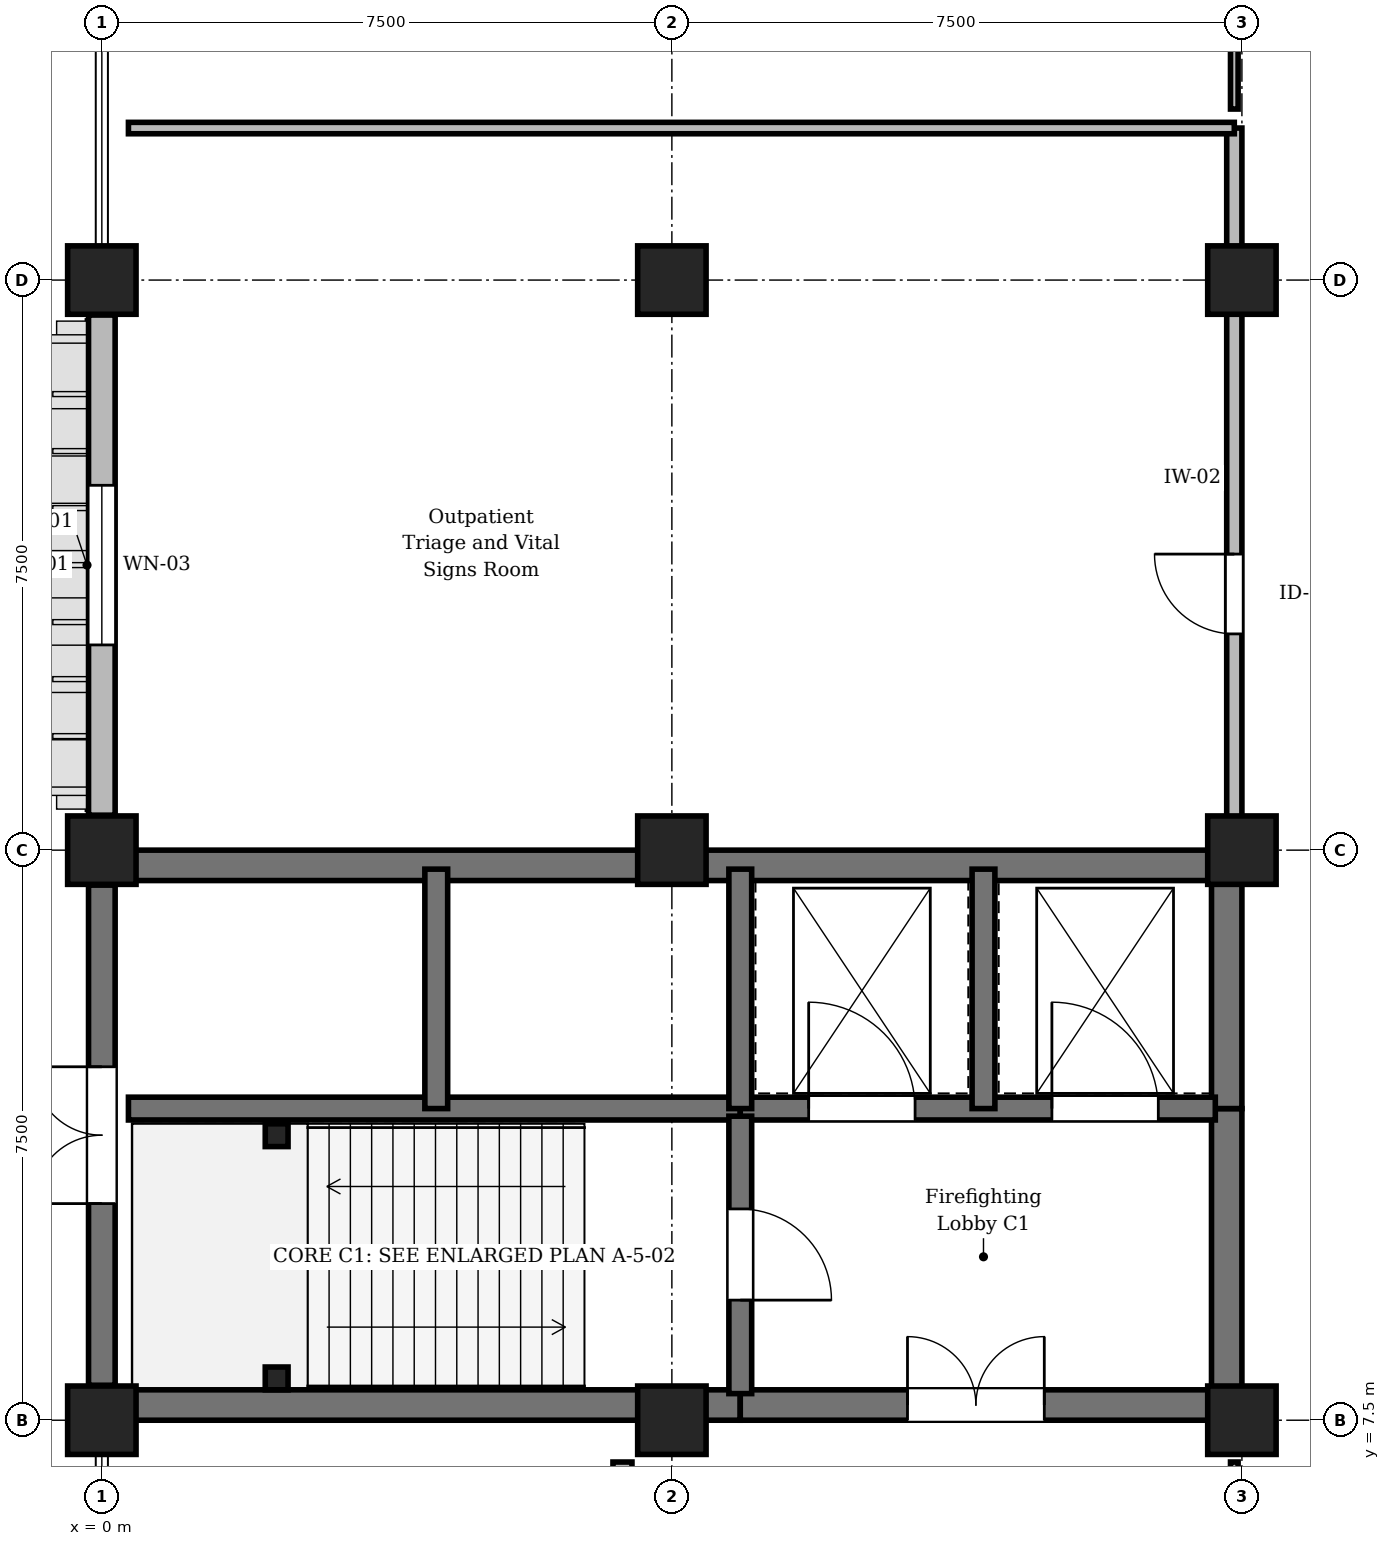
"""IFC4 building model, lengths in metres.
Left out: names, types, materials, properties, quantities, classifications, styles, units other than length and angle.
Written with IfcOpenShell. Run it as: python <this file> out.ifc"""

import sys

from ifc_helpers import new_model, si_unit, direction, frame, frame_2d, origin, origin_2d, place, context, subcontext, project, spatial, rectangle, circle, i_section, extrude, element, fill, save


model = new_model("IFC4")
c1 = context("Model", 3, precision=1e-05, world=origin(), true_north=direction((0.0, 1.0)))
c2 = subcontext(c1, "Body", "Model", "MODEL_VIEW")
j1 = project(units=[si_unit("LENGTHUNIT", "METRE"), si_unit("PLANEANGLEUNIT", "RADIAN")], contexts=[c1])
p1 = place(None, origin())
s1 = spatial("IfcSite", under=j1, at=p1, CompositionType="ELEMENT")
p2 = place(p1, origin())
s2 = spatial("IfcBuilding", under=s1, at=p2, CompositionType="ELEMENT")
p3 = place(p2, origin())
s3 = spatial("IfcBuildingStorey", under=s2, at=p3, CompositionType="ELEMENT", Elevation=0.0)
for number, where, z_axis, x_axis in (
    (1, (0.0, 7.5, 0.0), (0.0, 0.0, 1.0), (1.0, 0.0, 0.0)),
    (2, (0.0, 15.0, 0.0), (0.0, 0.0, 1.0), (1.0, 0.0, 0.0)),
):
    element("IfcColumn", number, at=place(p3, frame(where, z_axis=z_axis, x_axis=x_axis)), inside=s3, PredefinedType="COLUMN", context=c2, shape_type="SweptSolid", body=[
        extrude(rectangle(XDim=0.9, YDim=0.9, at=origin_2d()), origin(), (0.0, 0.0, 1.0), 4.8),
    ])
p4 = place(p3, frame((0.0, 22.5, 0.0), z_axis=(0.0, 0.0, 1.0), x_axis=(1.0, 0.0, 0.0)))
e3 = element("IfcColumn", 3, at=p4, inside=s3, PredefinedType="COLUMN", context=c2, shape_type="SweptSolid", body=[
    extrude(circle(Radius=0.45, at=origin_2d()), origin(), (0.0, 0.0, 1.0), 4.8),
])
p5 = place(p3, frame((7.5, 7.5, 0.0), z_axis=(0.0, 0.0, 1.0), x_axis=(1.0, 0.0, 0.0)))
e4 = element("IfcColumn", 4, at=p5, inside=s3, PredefinedType="COLUMN", context=c2, shape_type="SweptSolid", body=[
    extrude(rectangle(XDim=0.9, YDim=0.9, at=origin_2d()), origin(), (0.0, 0.0, 1.0), 4.8),
])
p6 = place(p3, frame((7.5, 15.0, 0.0), z_axis=(0.0, 0.0, 1.0), x_axis=(1.0, 0.0, 0.0)))
e5 = element("IfcColumn", 5, at=p6, inside=s3, PredefinedType="COLUMN", context=c2, shape_type="SweptSolid", body=[
    extrude(circle(Radius=0.45, at=origin_2d()), origin(), (0.0, 0.0, 1.0), 4.8),
])
p7 = place(p3, frame((7.5, 22.5, 0.0), z_axis=(0.0, 0.0, 1.0), x_axis=(1.0, 0.0, 0.0)))
e6 = element("IfcColumn", 6, at=p7, inside=s3, PredefinedType="COLUMN", context=c2, shape_type="SweptSolid", body=[
    extrude(rectangle(XDim=0.9, YDim=0.9, at=origin_2d()), origin(), (0.0, 0.0, 1.0), 4.8),
])
p8 = place(p3, frame((15.0, 7.5, 0.0), z_axis=(0.0, 0.0, 1.0), x_axis=(1.0, 0.0, 0.0)))
e7 = element("IfcColumn", 7, at=p8, inside=s3, PredefinedType="COLUMN", context=c2, shape_type="SweptSolid", body=[
    extrude(circle(Radius=0.45, at=origin_2d()), origin(), (0.0, 0.0, 1.0), 4.8),
])
for number, where, z_axis, x_axis in (
    (8, (15.0, 15.0, 0.0), (0.0, 0.0, 1.0), (1.0, 0.0, 0.0)),
    (9, (15.0, 22.5, 0.0), (0.0, 0.0, 1.0), (1.0, 0.0, 0.0)),
):
    element("IfcColumn", number, at=place(p3, frame(where, z_axis=z_axis, x_axis=x_axis)), inside=s3, PredefinedType="COLUMN", context=c2, shape_type="SweptSolid", body=[
        extrude(rectangle(XDim=0.9, YDim=0.9, at=origin_2d()), origin(), (0.0, 0.0, 1.0), 4.8),
    ])
for number, where, z_axis, x_axis in (
    (10, (2.3, 8.05, 0.0), (0.0, 0.0, 1.0), (1.0, 0.0, 0.0)),
    (11, (2.3, 11.25, 0.0), (0.0, 0.0, 1.0), (1.0, 0.0, 0.0)),
):
    element("IfcColumn", number, at=place(p3, frame(where, z_axis=z_axis, x_axis=x_axis)), inside=s3, PredefinedType="COLUMN", context=c2, shape_type="SweptSolid", body=[
        extrude(i_section(OverallWidth=0.3, OverallDepth=0.3, WebThickness=0.011, FlangeThickness=0.019, FilletRadius=0.027, at=origin_2d()), origin(), (0.0, 0.0, 1.0), 4.8),
    ])
p9 = place(p3, frame((0.0, 7.96, 0.0), z_axis=(0.0, 0.0, 1.0), x_axis=(0.0, 1.0, 0.0)))
e12 = element("IfcWall", 12, at=p9, inside=s3, PredefinedType="SHEAR", context=c2, shape_type="SweptSolid", body=[
    extrude(rectangle(XDim=6.58, YDim=0.35, at=frame_2d((3.29, 0.0))), origin(), (0.0, 0.0, 1.0), 4.5),
])
p10 = place(p9, frame((2.39, 0.0, 0.0)))
e13 = element("IfcOpeningElement", 13, at=p10, cuts=e12, PredefinedType="OPENING", context=c2, shape_type="SweptSolid", body=[
    extrude(rectangle(XDim=1.8, YDim=2.5, at=frame_2d((0.9, 1.25))), frame((0.0, 0.185, 0.0), z_axis=(0.0, -1.0, 0.0), x_axis=(1.0, 0.0, 0.0)), (0.0, 0.0, 1.0), 0.37),
])
p11 = place(p3, frame((0.0, 15.46, 0.0), z_axis=(0.0, 0.0, 1.0), x_axis=(0.0, 1.0, 0.0)))
e14 = element("IfcWall", 14, at=p11, inside=s3, PredefinedType="STANDARD", context=c2, shape_type="SweptSolid", body=[
    extrude(rectangle(XDim=6.58, YDim=0.35, at=frame_2d((3.29, 0.0))), origin(), (0.0, 0.0, 1.0), 3.9),
])
p12 = place(p11, frame((2.24, 0.0, 0.9)))
e15 = element("IfcOpeningElement", 15, at=p12, cuts=e14, PredefinedType="OPENING", context=c2, shape_type="SweptSolid", body=[
    extrude(rectangle(XDim=2.1, YDim=2.4, at=frame_2d((1.05, 1.2))), frame((0.0, 0.185, 0.0), z_axis=(0.0, -1.0, 0.0), x_axis=(1.0, 0.0, 0.0)), (0.0, 0.0, 1.0), 0.37),
])
p13 = place(p3, frame((0.35, 7.7, 0.0), z_axis=(0.0, 0.0, 1.0), x_axis=(1.0, 0.0, 0.0)))
e16 = element("IfcWall", 16, at=p13, inside=s3, PredefinedType="SHEAR", context=c2, shape_type="SweptSolid", body=[
    extrude(rectangle(XDim=8.05, YDim=0.4, at=frame_2d((4.025, 0.0))), origin(), (0.0, 0.0, 1.0), 4.5),
])
p14 = place(p3, frame((8.4, 7.7, 0.0), z_axis=(0.0, 0.0, 1.0), x_axis=(1.0, 0.0, 0.0)))
e17 = element("IfcWall", 17, at=p14, inside=s3, PredefinedType="SHEAR", context=c2, shape_type="SweptSolid", body=[
    extrude(rectangle(XDim=6.25, YDim=0.4, at=frame_2d((3.125, 0.0))), origin(), (0.0, 0.0, 1.0), 4.5),
])
p15 = place(p14, frame((2.2, 0.0, 0.0)))
e18 = element("IfcOpeningElement", 18, at=p15, cuts=e17, PredefinedType="OPENING", context=c2, shape_type="SweptSolid", body=[
    extrude(rectangle(XDim=1.8, YDim=2.25, at=frame_2d((0.9, 1.125))), frame((0.0, 0.21, 0.0), z_axis=(0.0, -1.0, 0.0), x_axis=(1.0, 0.0, 0.0)), (0.0, 0.0, 1.0), 0.42),
])
p16 = place(p3, frame((0.35, 14.8, 0.0), z_axis=(0.0, 0.0, 1.0), x_axis=(1.0, 0.0, 0.0)))
e19 = element("IfcWall", 19, at=p16, inside=s3, PredefinedType="SHEAR", context=c2, shape_type="SweptSolid", body=[
    extrude(rectangle(XDim=14.3, YDim=0.4, at=frame_2d((7.15, 0.0))), origin(), (0.0, 0.0, 1.0), 4.5),
])
p17 = place(p3, frame((14.8, 7.85, 0.0), z_axis=(0.0, 0.0, 1.0), x_axis=(0.0, 1.0, 0.0)))
e20 = element("IfcWall", 20, at=p17, inside=s3, PredefinedType="SHEAR", context=c2, shape_type="SweptSolid", body=[
    extrude(rectangle(XDim=3.75, YDim=0.4, at=frame_2d((1.875, 0.0))), origin(), (0.0, 0.0, 1.0), 4.5),
])
p18 = place(p3, frame((14.8, 11.6, 0.0), z_axis=(0.0, 0.0, 1.0), x_axis=(0.0, 1.0, 0.0)))
e21 = element("IfcWall", 21, at=p18, inside=s3, PredefinedType="SHEAR", context=c2, shape_type="SweptSolid", body=[
    extrude(rectangle(XDim=3.05, YDim=0.4, at=frame_2d((1.525, 0.0))), origin(), (0.0, 0.0, 1.0), 4.5),
])
p19 = place(p3, frame((0.35, 11.6, 0.0), z_axis=(0.0, 0.0, 1.0), x_axis=(1.0, 0.0, 0.0)))
e22 = element("IfcWall", 22, at=p19, inside=s3, PredefinedType="SHEAR", context=c2, shape_type="SweptSolid", body=[
    extrude(rectangle(XDim=8.05, YDim=0.3, at=frame_2d((4.025, 0.0))), origin(), (0.0, 0.0, 1.0), 4.5),
])
p20 = place(p3, frame((8.4, 11.6, 0.0), z_axis=(0.0, 0.0, 1.0), x_axis=(1.0, 0.0, 0.0)))
e23 = element("IfcWall", 23, at=p20, inside=s3, PredefinedType="SHEAR", context=c2, shape_type="SweptSolid", body=[
    extrude(rectangle(XDim=6.25, YDim=0.3, at=frame_2d((3.125, 0.0))), origin(), (0.0, 0.0, 1.0), 4.5),
])
p21 = place(p20, frame((0.9, 0.0, 0.0)))
e24 = element("IfcOpeningElement", 24, at=p21, cuts=e23, PredefinedType="OPENING", context=c2, shape_type="SweptSolid", body=[
    extrude(rectangle(XDim=1.4, YDim=2.25, at=frame_2d((0.7, 1.125))), frame((0.0, 0.16, 0.0), z_axis=(0.0, -1.0, 0.0), x_axis=(1.0, 0.0, 0.0)), (0.0, 0.0, 1.0), 0.32),
])
p22 = place(p20, frame((4.1, 0.0, 0.0)))
e25 = element("IfcOpeningElement", 25, at=p22, cuts=e23, PredefinedType="OPENING", context=c2, shape_type="SweptSolid", body=[
    extrude(rectangle(XDim=1.4, YDim=2.25, at=frame_2d((0.7, 1.125))), frame((0.0, 0.16, 0.0), z_axis=(0.0, -1.0, 0.0), x_axis=(1.0, 0.0, 0.0)), (0.0, 0.0, 1.0), 0.32),
])
p23 = place(p3, frame((8.4, 11.5, 0.0), z_axis=(0.0, 0.0, 1.0), x_axis=(0.0, -1.0, 0.0)))
e26 = element("IfcWall", 26, at=p23, inside=s3, PredefinedType="SHEAR", context=c2, shape_type="SweptSolid", body=[
    extrude(rectangle(XDim=3.65, YDim=0.3, at=frame_2d((1.825, 0.0))), origin(), (0.0, 0.0, 1.0), 4.5),
])
p24 = place(p23, frame((1.22, 0.0, 0.0)))
e27 = element("IfcOpeningElement", 27, at=p24, cuts=e26, PredefinedType="OPENING", context=c2, shape_type="SweptSolid", body=[
    extrude(rectangle(XDim=1.2, YDim=2.25, at=frame_2d((0.6, 1.125))), frame((0.0, 0.16, 0.0), z_axis=(0.0, -1.0, 0.0), x_axis=(1.0, 0.0, 0.0)), (0.0, 0.0, 1.0), 0.32),
])
for number, where, z_axis, x_axis in (
    (28, (4.4, 11.6, 0.0), (0.0, 0.0, 1.0), (0.0, 1.0, 0.0)),
    (29, (8.4, 11.6, 0.0), (0.0, 0.0, 1.0), (0.0, 1.0, 0.0)),
    (30, (11.6, 11.6, 0.0), (0.0, 0.0, 1.0), (0.0, 1.0, 0.0)),
):
    element("IfcWall", number, at=place(p3, frame(where, z_axis=z_axis, x_axis=x_axis)), inside=s3, PredefinedType="SHEAR", context=c2, shape_type="SweptSolid", body=[
        extrude(rectangle(XDim=3.15, YDim=0.3, at=frame_2d((1.575, 0.0))), origin(), (0.0, 0.0, 1.0), 4.5),
    ])
p25 = place(p3, frame((6.85, 0.35, 0.0), z_axis=(0.0, 0.0, 1.0), x_axis=(0.0, 1.0, 0.0)))
e31 = element("IfcWall", 31, at=p25, inside=s3, PredefinedType="STANDARD", context=c2, shape_type="SweptSolid", body=[
    extrude(rectangle(XDim=6.6, YDim=0.25, at=frame_2d((3.3, 0.0))), origin(), (0.0, 0.0, 1.0), 4.485),
])
p26 = place(p25, frame((2.75, 0.0, 0.0)))
e32 = element("IfcOpeningElement", 32, at=p26, cuts=e31, PredefinedType="OPENING", context=c2, shape_type="SweptSolid", body=[
    extrude(rectangle(XDim=1.1, YDim=2.2, at=frame_2d((0.55, 1.1))), frame((0.0, 0.135, 0.0), z_axis=(0.0, -1.0, 0.0), x_axis=(1.0, 0.0, 0.0)), (0.0, 0.0, 1.0), 0.27),
])
p27 = place(p3, frame((14.9, 0.35, 0.0), z_axis=(0.0, 0.0, 1.0), x_axis=(0.0, 1.0, 0.0)))
e33 = element("IfcWall", 33, at=p27, inside=s3, PredefinedType="PARTITIONING", context=c2, shape_type="SweptSolid", body=[
    extrude(rectangle(XDim=6.6, YDim=0.1, at=frame_2d((3.3, 0.0))), origin(), (0.0, 0.0, 1.0), 3.935),
])
p28 = place(p27, frame((2.775, 0.0, 0.0)))
e34 = element("IfcOpeningElement", 34, at=p28, cuts=e33, PredefinedType="OPENING", context=c2, shape_type="SweptSolid", body=[
    extrude(rectangle(XDim=1.05, YDim=2.2, at=frame_2d((0.525, 1.1))), frame((0.0, 0.06, 0.0), z_axis=(0.0, -1.0, 0.0), x_axis=(1.0, 0.0, 0.0)), (0.0, 0.0, 1.0), 0.12),
])
p29 = place(p3, frame((14.9, 15.3, 0.0), z_axis=(0.0, 0.0, 1.0), x_axis=(0.0, 1.0, 0.0)))
e35 = element("IfcWall", 35, at=p29, inside=s3, PredefinedType="STANDARD", context=c2, shape_type="SweptSolid", body=[
    extrude(rectangle(XDim=9.2, YDim=0.2, at=frame_2d((4.6, 0.0))), origin(), (0.0, 0.0, 1.0), 3.785),
])
p30 = place(p29, frame((2.545, 0.0, 0.0)))
e36 = element("IfcOpeningElement", 36, at=p30, cuts=e35, PredefinedType="OPENING", context=c2, shape_type="SweptSolid", body=[
    extrude(rectangle(XDim=1.05, YDim=2.2, at=frame_2d((0.525, 1.1))), frame((0.0, 0.11, 0.0), z_axis=(0.0, -1.0, 0.0), x_axis=(1.0, 0.0, 0.0)), (0.0, 0.0, 1.0), 0.22),
])
p31 = place(p3, frame((14.9, 24.75, 0.0), z_axis=(0.0, 0.0, 1.0), x_axis=(0.0, 1.0, 0.0)))
e37 = element("IfcWall", 37, at=p31, inside=s3, PredefinedType="PARTITIONING", context=c2, shape_type="SweptSolid", body=[
    extrude(rectangle(XDim=9.75, YDim=0.1, at=frame_2d((4.875, 0.0))), origin(), (0.0, 0.0, 1.0), 3.785),
])
p32 = place(p31, frame((1.89, 0.0, 0.0)))
e38 = element("IfcOpeningElement", 38, at=p32, cuts=e37, PredefinedType="OPENING", context=c2, shape_type="SweptSolid", body=[
    extrude(rectangle(XDim=1.05, YDim=2.2, at=frame_2d((0.525, 1.1))), frame((0.0, 0.06, 0.0), z_axis=(0.0, -1.0, 0.0), x_axis=(1.0, 0.0, 0.0)), (0.0, 0.0, 1.0), 0.12),
])
p33 = place(p3, frame((0.35, 24.5, 0.0), z_axis=(0.0, 0.0, 1.0), x_axis=(1.0, 0.0, 0.0)))
e39 = element("IfcWall", 39, at=p33, inside=s3, PredefinedType="PARTITIONING", context=c2, shape_type="SweptSolid", body=[
    extrude(rectangle(XDim=14.55, YDim=0.15, at=frame_2d((7.275, 0.0))), origin(), (0.0, 0.0, 1.0), 4.485),
])
p34 = place(p10, origin())
e40 = element("IfcDoor", 40, at=p34, inside=s3, OperationType="DOUBLE_DOOR_SINGLE_SWING", PredefinedType="DOOR", context=c2, shape_type="SweptSolid", body=[
    extrude(rectangle(XDim=1.8, YDim=2.5, at=frame_2d((0.9, 1.25))), frame((0.0, 0.025, 0.0), z_axis=(0.0, -1.0, 0.0), x_axis=(1.0, 0.0, 0.0)), (0.0, 0.0, 1.0), 0.05),
])
fill(e13, e40)
p35 = place(p12, origin())
e41 = element("IfcWindow", 41, at=p35, inside=s3, PartitioningType="SINGLE_PANEL", PredefinedType="WINDOW", context=c2, shape_type="SweptSolid", body=[
    extrude(rectangle(XDim=2.1, YDim=2.4, at=frame_2d((1.05, 1.2))), frame((0.0, 0.03, 0.0), z_axis=(0.0, -1.0, 0.0), x_axis=(1.0, 0.0, 0.0)), (0.0, 0.0, 1.0), 0.06),
])
fill(e15, e41)
p36 = place(p15, origin())
e42 = element("IfcDoor", 42, at=p36, inside=s3, OperationType="DOUBLE_DOOR_SINGLE_SWING", PredefinedType="DOOR", context=c2, shape_type="SweptSolid", body=[
    extrude(rectangle(XDim=1.8, YDim=2.25, at=frame_2d((0.9, 1.125))), frame((0.0, 0.025, 0.0), z_axis=(0.0, -1.0, 0.0), x_axis=(1.0, 0.0, 0.0)), (0.0, 0.0, 1.0), 0.05),
])
fill(e18, e42)
p37 = place(p21, origin())
e43 = element("IfcDoor", 43, at=p37, inside=s3, OperationType="DOUBLE_DOOR_SLIDING", PredefinedType="DOOR", context=c2, shape_type="SweptSolid", body=[
    extrude(rectangle(XDim=1.4, YDim=2.25, at=frame_2d((0.7, 1.125))), frame((0.0, 0.025, 0.0), z_axis=(0.0, -1.0, 0.0), x_axis=(1.0, 0.0, 0.0)), (0.0, 0.0, 1.0), 0.05),
])
fill(e24, e43)
p38 = place(p22, origin())
e44 = element("IfcDoor", 44, at=p38, inside=s3, OperationType="DOUBLE_DOOR_SLIDING", PredefinedType="DOOR", context=c2, shape_type="SweptSolid", body=[
    extrude(rectangle(XDim=1.4, YDim=2.25, at=frame_2d((0.7, 1.125))), frame((0.0, 0.025, 0.0), z_axis=(0.0, -1.0, 0.0), x_axis=(1.0, 0.0, 0.0)), (0.0, 0.0, 1.0), 0.05),
])
fill(e25, e44)
p39 = place(p24, origin())
e45 = element("IfcDoor", 45, at=p39, inside=s3, OperationType="SINGLE_SWING_RIGHT", PredefinedType="DOOR", context=c2, shape_type="SweptSolid", body=[
    extrude(rectangle(XDim=1.2, YDim=2.25, at=frame_2d((0.6, 1.125))), frame((0.0, 0.025, 0.0), z_axis=(0.0, -1.0, 0.0), x_axis=(1.0, 0.0, 0.0)), (0.0, 0.0, 1.0), 0.05),
])
fill(e27, e45)
p40 = place(p30, origin())
e46 = element("IfcDoor", 46, at=p40, inside=s3, OperationType="SINGLE_SWING_RIGHT", PredefinedType="DOOR", context=c2, shape_type="SweptSolid", body=[
    extrude(rectangle(XDim=1.05, YDim=2.2, at=frame_2d((0.525, 1.1))), frame((0.0, 0.025, 0.0), z_axis=(0.0, -1.0, 0.0), x_axis=(1.0, 0.0, 0.0)), (0.0, 0.0, 1.0), 0.05),
])
fill(e36, e46)
save(model, sys.argv[1])
